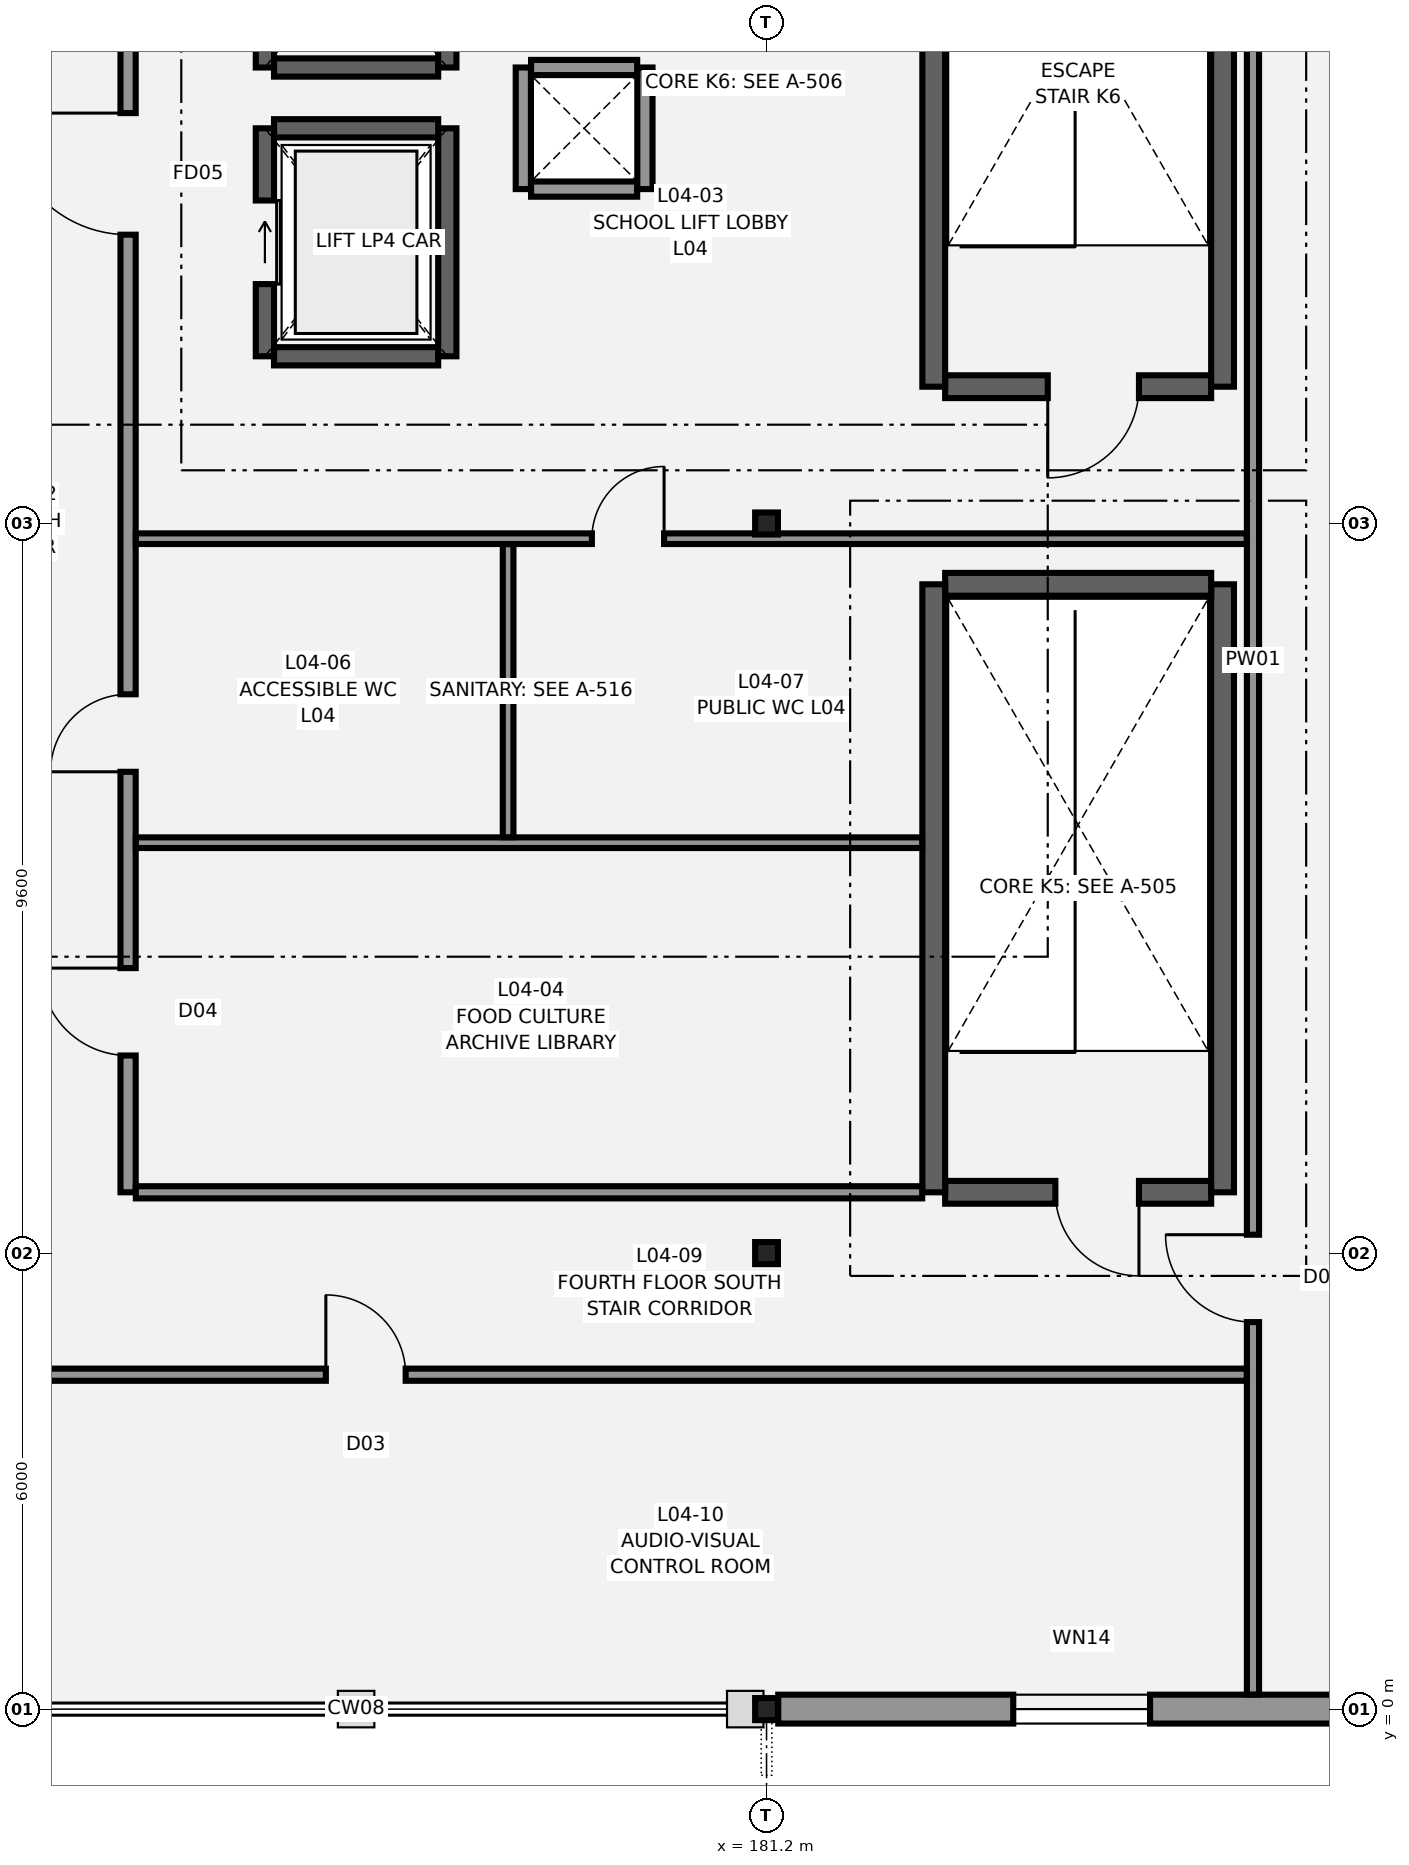
"""IFC4 building model, lengths in metres.
Left out: names, types, materials, properties, quantities, classifications, styles, units other than length and angle.
Written with IfcOpenShell. Run it as: python <this file> out.ifc"""

import sys

from ifc_helpers import new_model, si_unit, direction, frame, frame_2d, origin, origin_2d, place, context, subcontext, project, spatial, rectangle, i_section, extrude, element, fill, save


model = new_model("IFC4")
c1 = context("Model", 3, precision=1e-05, world=origin(), true_north=direction((0.0, 1.0)))
c2 = subcontext(c1, "Body", "Model", "MODEL_VIEW")
j1 = project(units=[si_unit("LENGTHUNIT", "METRE"), si_unit("PLANEANGLEUNIT", "RADIAN")], contexts=[c1])
p1 = place(None, origin())
s1 = spatial("IfcSite", under=j1, at=p1, CompositionType="ELEMENT")
p2 = place(p1, origin())
s2 = spatial("IfcBuilding", under=s1, at=p2, CompositionType="ELEMENT")
p3 = place(p2, frame((0.0, 0.0, 18.6)))
s3 = spatial("IfcBuildingStorey", under=s2, at=p3, CompositionType="ELEMENT", Elevation=18.6)
for number, where, z_axis, x_axis in (
    (1, (181.2, 0.0, 0.0), (0.0, 0.0, 1.0), (1.0, 0.0, 0.0)),
    (2, (181.2, 6.0, 0.0), (0.0, 0.0, 1.0), (1.0, 0.0, 0.0)),
    (3, (181.2, 15.6, 0.0), (0.0, 0.0, 1.0), (1.0, 0.0, 0.0)),
):
    element("IfcColumn", number, at=place(p3, frame(where, z_axis=z_axis, x_axis=x_axis)), inside=s3, PredefinedType="COLUMN", context=c2, shape_type="SweptSolid", body=[
        extrude(i_section(OverallWidth=0.3, OverallDepth=0.29, WebThickness=0.009, FlangeThickness=0.014, FilletRadius=0.027, at=origin_2d()), origin(), (0.0, 0.0, 1.0), 2.9),
    ])
p4 = place(p3, frame((187.05, 6.8, 0.0), z_axis=(0.0, 0.0, 1.0), x_axis=(-1.0, 0.0, 0.0)))
e4 = element("IfcWall", 4, at=p4, inside=s3, PredefinedType="SHEAR", context=c2, shape_type="SweptSolid", body=[
    extrude(rectangle(XDim=3.5, YDim=0.3, at=frame_2d((1.75, 0.0))), origin(), (0.0, 0.0, 1.0), 2.7),
])
p5 = place(p4, frame((0.95, 0.0, 0.0)))
e5 = element("IfcOpeningElement", 5, at=p5, cuts=e4, PredefinedType="OPENING", context=c2, shape_type="SweptSolid", body=[
    extrude(rectangle(XDim=1.1, YDim=2.15, at=frame_2d((0.55, 1.075))), frame((0.0, 0.16, 0.0), z_axis=(0.0, -1.0, 0.0), x_axis=(1.0, 0.0, 0.0)), (0.0, 0.0, 1.0), 0.32),
])
p6 = place(p3, frame((187.2, 6.8, 0.0), z_axis=(0.0, 0.0, 1.0), x_axis=(0.0, 1.0, 0.0)))
e6 = element("IfcWall", 6, at=p6, inside=s3, PredefinedType="SHEAR", context=c2, shape_type="SweptSolid", body=[
    extrude(rectangle(XDim=8.0, YDim=0.3, at=frame_2d((4.0, 0.0))), origin(), (0.0, 0.0, 1.0), 2.7),
])
p7 = place(p3, frame((187.05, 14.8, 0.0), z_axis=(0.0, 0.0, 1.0), x_axis=(-1.0, 0.0, 0.0)))
e7 = element("IfcWall", 7, at=p7, inside=s3, PredefinedType="SHEAR", context=c2, shape_type="SweptSolid", body=[
    extrude(rectangle(XDim=3.5, YDim=0.3, at=frame_2d((1.75, 0.0))), origin(), (0.0, 0.0, 1.0), 2.7),
])
p8 = place(p3, frame((183.4, 14.8, 0.0), z_axis=(0.0, 0.0, 1.0), x_axis=(0.0, -1.0, 0.0)))
e8 = element("IfcWall", 8, at=p8, inside=s3, PredefinedType="SHEAR", context=c2, shape_type="SweptSolid", body=[
    extrude(rectangle(XDim=8.0, YDim=0.3, at=frame_2d((4.0, 0.0))), origin(), (0.0, 0.0, 1.0), 2.7),
])
p9 = place(p3, frame((187.05, 17.4, 0.0), z_axis=(0.0, 0.0, 1.0), x_axis=(-1.0, 0.0, 0.0)))
e9 = element("IfcWall", 9, at=p9, inside=s3, PredefinedType="SHEAR", context=c2, shape_type="SweptSolid", body=[
    extrude(rectangle(XDim=3.5, YDim=0.3, at=frame_2d((1.75, 0.0))), origin(), (0.0, 0.0, 1.0), 2.7),
])
p10 = place(p9, frame((0.95, 0.0, 0.0)))
e10 = element("IfcOpeningElement", 10, at=p10, cuts=e9, PredefinedType="OPENING", context=c2, shape_type="SweptSolid", body=[
    extrude(rectangle(XDim=1.2, YDim=2.2, at=frame_2d((0.6, 1.1))), frame((0.0, 0.16, 0.0), z_axis=(0.0, -1.0, 0.0), x_axis=(1.0, 0.0, 0.0)), (0.0, 0.0, 1.0), 0.32),
])
for number, where, z_axis, x_axis in (
    (11, (187.2, 17.4, 0.0), (0.0, 0.0, 1.0), (0.0, 1.0, 0.0)),
    (12, (183.4, 25.4, 0.0), (0.0, 0.0, 1.0), (0.0, -1.0, 0.0)),
):
    element("IfcWall", number, at=place(p3, frame(where, z_axis=z_axis, x_axis=x_axis)), inside=s3, PredefinedType="SHEAR", context=c2, shape_type="SweptSolid", body=[
        extrude(rectangle(XDim=8.0, YDim=0.3, at=frame_2d((4.0, 0.0))), origin(), (0.0, 0.0, 1.0), 2.7),
    ])
p11 = place(p3, frame((174.72, 17.8, 0.0), z_axis=(0.0, 0.0, 1.0), x_axis=(1.0, 0.0, 0.0)))
e13 = element("IfcWall", 13, at=p11, inside=s3, PredefinedType="SHEAR", context=c2, shape_type="SweptSolid", body=[
    extrude(rectangle(XDim=2.16, YDim=0.24, at=frame_2d((1.08, 0.0))), origin(), (0.0, 0.0, 1.0), 2.7),
])
p12 = place(p3, frame((177.0, 17.8, 0.0), z_axis=(0.0, 0.0, 1.0), x_axis=(0.0, 1.0, 0.0)))
e14 = element("IfcWall", 14, at=p12, inside=s3, PredefinedType="SHEAR", context=c2, shape_type="SweptSolid", body=[
    extrude(rectangle(XDim=3.0, YDim=0.24, at=frame_2d((1.5, 0.0))), origin(), (0.0, 0.0, 1.0), 2.7),
])
p13 = place(p3, frame((176.88, 20.8, 0.0), z_axis=(0.0, 0.0, 1.0), x_axis=(-1.0, 0.0, 0.0)))
e15 = element("IfcWall", 15, at=p13, inside=s3, PredefinedType="SHEAR", context=c2, shape_type="SweptSolid", body=[
    extrude(rectangle(XDim=2.16, YDim=0.24, at=frame_2d((1.08, 0.0))), origin(), (0.0, 0.0, 1.0), 2.7),
])
p14 = place(p3, frame((174.6, 20.8, 0.0), z_axis=(0.0, 0.0, 1.0), x_axis=(0.0, -1.0, 0.0)))
e16 = element("IfcWall", 16, at=p14, inside=s3, PredefinedType="SHEAR", context=c2, shape_type="SweptSolid", body=[
    extrude(rectangle(XDim=3.0, YDim=0.24, at=frame_2d((1.5, 0.0))), origin(), (0.0, 0.0, 1.0), 2.7),
])
p15 = place(p14, frame((0.95, 0.0, 0.0)))
e17 = element("IfcOpeningElement", 17, at=p15, cuts=e16, PredefinedType="OPENING", context=c2, shape_type="SweptSolid", body=[
    extrude(rectangle(XDim=1.1, YDim=2.1, at=frame_2d((0.55, 1.05))), frame((0.0, 0.13, 0.0), z_axis=(0.0, -1.0, 0.0), x_axis=(1.0, 0.0, 0.0)), (0.0, 0.0, 1.0), 0.26),
])
p16 = place(p3, frame((174.72, 21.6, 0.0), z_axis=(0.0, 0.0, 1.0), x_axis=(1.0, 0.0, 0.0)))
e18 = element("IfcWall", 18, at=p16, inside=s3, PredefinedType="SHEAR", context=c2, shape_type="SweptSolid", body=[
    extrude(rectangle(XDim=2.16, YDim=0.24, at=frame_2d((1.08, 0.0))), origin(), (0.0, 0.0, 1.0), 2.7),
])
p17 = place(p3, frame((177.0, 21.6, 0.0), z_axis=(0.0, 0.0, 1.0), x_axis=(0.0, 1.0, 0.0)))
e19 = element("IfcWall", 19, at=p17, inside=s3, PredefinedType="SHEAR", context=c2, shape_type="SweptSolid", body=[
    extrude(rectangle(XDim=3.0, YDim=0.24, at=frame_2d((1.5, 0.0))), origin(), (0.0, 0.0, 1.0), 2.7),
])
p18 = place(p3, frame((174.6, 24.6, 0.0), z_axis=(0.0, 0.0, 1.0), x_axis=(0.0, -1.0, 0.0)))
e20 = element("IfcWall", 20, at=p18, inside=s3, PredefinedType="SHEAR", context=c2, shape_type="SweptSolid", body=[
    extrude(rectangle(XDim=3.0, YDim=0.24, at=frame_2d((1.5, 0.0))), origin(), (0.0, 0.0, 1.0), 2.7),
])
p19 = place(p18, frame((0.95, 0.0, 0.0)))
e21 = element("IfcOpeningElement", 21, at=p19, cuts=e20, PredefinedType="OPENING", context=c2, shape_type="SweptSolid", body=[
    extrude(rectangle(XDim=1.1, YDim=2.1, at=frame_2d((0.55, 1.05))), frame((0.0, 0.13, 0.0), z_axis=(0.0, -1.0, 0.0), x_axis=(1.0, 0.0, 0.0)), (0.0, 0.0, 1.0), 0.26),
])
p20 = place(p3, frame((191.846, 0.0, 0.0), z_axis=(0.0, 0.0, 1.0), x_axis=(-1.0, 0.0, 0.0)))
e22 = element("IfcWall", 22, at=p20, inside=s3, PredefinedType="STANDARD", context=c2, shape_type="SweptSolid", body=[
    extrude(rectangle(XDim=10.492, YDim=0.38, at=frame_2d((5.246, 0.0))), origin(), (0.0, 0.0, 1.0), 2.45),
])
p21 = place(p20, frame((1.0, 0.0, 0.8)))
e23 = element("IfcOpeningElement", 23, at=p21, cuts=e22, PredefinedType="OPENING", context=c2, shape_type="SweptSolid", body=[
    extrude(rectangle(XDim=2.2, YDim=1.4, at=frame_2d((1.1, 0.7))), frame((0.0, 0.2, 0.0), z_axis=(0.0, -1.0, 0.0), x_axis=(1.0, 0.0, 0.0)), (0.0, 0.0, 1.0), 0.4),
])
p22 = place(p20, frame((5.6, 0.0, 0.8)))
e24 = element("IfcOpeningElement", 24, at=p22, cuts=e22, PredefinedType="OPENING", context=c2, shape_type="SweptSolid", body=[
    extrude(rectangle(XDim=1.8, YDim=1.4, at=frame_2d((0.9, 0.7))), frame((0.0, 0.2, 0.0), z_axis=(0.0, -1.0, 0.0), x_axis=(1.0, 0.0, 0.0)), (0.0, 0.0, 1.0), 0.4),
])
p23 = place(p3, frame((187.6, 0.192, 0.0), z_axis=(0.0, 0.0, 1.0), x_axis=(0.0, 1.0, 0.0)))
e25 = element("IfcWall", 25, at=p23, inside=s3, PredefinedType="PARTITIONING", context=c2, shape_type="SweptSolid", body=[
    extrude(rectangle(XDim=27.236, YDim=0.16, at=frame_2d((13.618, 0.0))), origin(), (0.0, 0.0, 1.0), 2.45),
])
p24 = place(p23, frame((4.9, 0.0, 0.0)))
e26 = element("IfcOpeningElement", 26, at=p24, cuts=e25, PredefinedType="OPENING", context=c2, shape_type="SweptSolid", body=[
    extrude(rectangle(XDim=1.15, YDim=2.15, at=frame_2d((0.575, 1.075))), frame((0.0, 0.09, 0.0), z_axis=(0.0, -1.0, 0.0), x_axis=(1.0, 0.0, 0.0)), (0.0, 0.0, 1.0), 0.18),
])
p25 = place(p3, frame((169.902, 4.4, 0.0), z_axis=(0.0, 0.0, 1.0), x_axis=(1.0, 0.0, 0.0)))
e27 = element("IfcWall", 27, at=p25, inside=s3, PredefinedType="PARTITIONING", context=c2, shape_type="SweptSolid", body=[
    extrude(rectangle(XDim=17.616, YDim=0.16, at=frame_2d((8.808, 0.0))), origin(), (0.0, 0.0, 1.0), 2.45),
])
p26 = place(p25, frame((5.5, 0.0, 0.0)))
e28 = element("IfcOpeningElement", 28, at=p26, cuts=e27, PredefinedType="OPENING", context=c2, shape_type="SweptSolid", body=[
    extrude(rectangle(XDim=1.05, YDim=2.15, at=frame_2d((0.525, 1.075))), frame((0.0, 0.09, 0.0), z_axis=(0.0, -1.0, 0.0), x_axis=(1.0, 0.0, 0.0)), (0.0, 0.0, 1.0), 0.18),
])
p27 = place(p3, frame((172.8, 6.8, 0.0), z_axis=(0.0, 0.0, 1.0), x_axis=(0.0, 1.0, 0.0)))
e29 = element("IfcWall", 29, at=p27, inside=s3, PredefinedType="PARTITIONING", context=c2, shape_type="SweptSolid", body=[
    extrude(rectangle(XDim=20.628, YDim=0.2, at=frame_2d((10.314, 0.0))), origin(), (0.0, 0.0, 1.0), 2.45),
])
p28 = place(p27, frame((1.8, 0.0, 0.0)))
e30 = element("IfcOpeningElement", 30, at=p28, cuts=e29, PredefinedType="OPENING", context=c2, shape_type="SweptSolid", body=[
    extrude(rectangle(XDim=1.15, YDim=2.15, at=frame_2d((0.575, 1.075))), frame((0.0, 0.11, 0.0), z_axis=(0.0, -1.0, 0.0), x_axis=(1.0, 0.0, 0.0)), (0.0, 0.0, 1.0), 0.22),
])
p29 = place(p27, frame((5.533, 0.0, 0.0)))
e31 = element("IfcOpeningElement", 31, at=p29, cuts=e29, PredefinedType="OPENING", context=c2, shape_type="SweptSolid", body=[
    extrude(rectangle(XDim=1.02, YDim=2.12, at=frame_2d((0.51, 1.06))), frame((0.0, 0.11, 0.0), z_axis=(0.0, -1.0, 0.0), x_axis=(1.0, 0.0, 0.0)), (0.0, 0.0, 1.0), 0.22),
])
p30 = place(p27, frame((12.6, 0.0, 0.0)))
e32 = element("IfcOpeningElement", 32, at=p30, cuts=e29, PredefinedType="OPENING", context=c2, shape_type="SweptSolid", body=[
    extrude(rectangle(XDim=1.6, YDim=2.2, at=frame_2d((0.8, 1.1))), frame((0.0, 0.11, 0.0), z_axis=(0.0, -1.0, 0.0), x_axis=(1.0, 0.0, 0.0)), (0.0, 0.0, 1.0), 0.22),
])
p31 = place(p27, frame((18.223, 0.0, 0.0)))
e33 = element("IfcOpeningElement", 33, at=p31, cuts=e29, PredefinedType="OPENING", context=c2, shape_type="SweptSolid", body=[
    extrude(rectangle(XDim=1.05, YDim=2.15, at=frame_2d((0.525, 1.075))), frame((0.0, 0.11, 0.0), z_axis=(0.0, -1.0, 0.0), x_axis=(1.0, 0.0, 0.0)), (0.0, 0.0, 1.0), 0.22),
])
p32 = place(p3, frame((172.902, 6.8, 0.0), z_axis=(0.0, 0.0, 1.0), x_axis=(1.0, 0.0, 0.0)))
e34 = element("IfcWall", 34, at=p32, inside=s3, PredefinedType="PARTITIONING", context=c2, shape_type="SweptSolid", body=[
    extrude(rectangle(XDim=10.346, YDim=0.16, at=frame_2d((5.173, 0.0))), origin(), (0.0, 0.0, 1.0), 2.45),
])
p33 = place(p3, frame((172.902, 11.4, 0.0), z_axis=(0.0, 0.0, 1.0), x_axis=(1.0, 0.0, 0.0)))
e35 = element("IfcWall", 35, at=p33, inside=s3, PredefinedType="PARTITIONING", context=c2, shape_type="SweptSolid", body=[
    extrude(rectangle(XDim=10.346, YDim=0.14, at=frame_2d((5.173, 0.0))), origin(), (0.0, 0.0, 1.0), 2.45),
])
p34 = place(p3, frame((172.902, 15.4, 0.0), z_axis=(0.0, 0.0, 1.0), x_axis=(1.0, 0.0, 0.0)))
e36 = element("IfcWall", 36, at=p34, inside=s3, PredefinedType="PARTITIONING", context=c2, shape_type="SweptSolid", body=[
    extrude(rectangle(XDim=14.616, YDim=0.14, at=frame_2d((7.308, 0.0))), origin(), (0.0, 0.0, 1.0), 2.45),
])
p35 = place(p34, frame((6.0, 0.0, 0.0)))
e37 = element("IfcOpeningElement", 37, at=p35, cuts=e36, PredefinedType="OPENING", context=c2, shape_type="SweptSolid", body=[
    extrude(rectangle(XDim=0.95, YDim=2.1, at=frame_2d((0.475, 1.05))), frame((0.0, 0.08, 0.0), z_axis=(0.0, -1.0, 0.0), x_axis=(1.0, 0.0, 0.0)), (0.0, 0.0, 1.0), 0.16),
])
p36 = place(p3, frame((177.8, 11.472, 0.0), z_axis=(0.0, 0.0, 1.0), x_axis=(0.0, 1.0, 0.0)))
e38 = element("IfcWall", 38, at=p36, inside=s3, PredefinedType="PARTITIONING", context=c2, shape_type="SweptSolid", body=[
    extrude(rectangle(XDim=3.856, YDim=0.14, at=frame_2d((1.928, 0.0))), origin(), (0.0, 0.0, 1.0), 2.45),
])
p37 = place(p3, frame((178.102, 20.0, 0.0), z_axis=(0.0, 0.0, 1.0), x_axis=(1.0, 0.0, 0.0)))
e39 = element("IfcWall", 39, at=p37, inside=s3, PredefinedType="PARTITIONING", context=c2, shape_type="SweptSolid", body=[
    extrude(rectangle(XDim=1.396, YDim=0.2, at=frame_2d((0.698, 0.0))), origin(), (0.0, 0.0, 1.0), 2.45),
])
p38 = place(p3, frame((179.6, 20.0, 0.0), z_axis=(0.0, 0.0, 1.0), x_axis=(0.0, 1.0, 0.0)))
e40 = element("IfcWall", 40, at=p38, inside=s3, PredefinedType="PARTITIONING", context=c2, shape_type="SweptSolid", body=[
    extrude(rectangle(XDim=1.6, YDim=0.2, at=frame_2d((0.8, 0.0))), origin(), (0.0, 0.0, 1.0), 2.45),
])
p39 = place(p3, frame((179.498, 21.6, 0.0), z_axis=(0.0, 0.0, 1.0), x_axis=(-1.0, 0.0, 0.0)))
e41 = element("IfcWall", 41, at=p39, inside=s3, PredefinedType="PARTITIONING", context=c2, shape_type="SweptSolid", body=[
    extrude(rectangle(XDim=1.396, YDim=0.2, at=frame_2d((0.698, 0.0))), origin(), (0.0, 0.0, 1.0), 2.45),
])
p40 = place(p3, frame((178.0, 21.6, 0.0), z_axis=(0.0, 0.0, 1.0), x_axis=(0.0, -1.0, 0.0)))
e42 = element("IfcWall", 42, at=p40, inside=s3, PredefinedType="PARTITIONING", context=c2, shape_type="SweptSolid", body=[
    extrude(rectangle(XDim=1.6, YDim=0.2, at=frame_2d((0.8, 0.0))), origin(), (0.0, 0.0, 1.0), 2.45),
])
p41 = place(p22, origin())
e43 = element("IfcWindow", 43, at=p41, inside=s3, PartitioningType="SINGLE_PANEL", PredefinedType="WINDOW", context=c2, shape_type="SweptSolid", body=[
    extrude(rectangle(XDim=1.8, YDim=1.4, at=frame_2d((0.9, 0.7))), frame((0.0, 0.03, 0.0), z_axis=(0.0, -1.0, 0.0), x_axis=(1.0, 0.0, 0.0)), (0.0, 0.0, 1.0), 0.06),
])
fill(e24, e43)
p42 = place(p24, origin())
e44 = element("IfcDoor", 44, at=p42, inside=s3, OperationType="SINGLE_SWING_RIGHT", PredefinedType="DOOR", context=c2, shape_type="SweptSolid", body=[
    extrude(rectangle(XDim=1.15, YDim=2.15, at=frame_2d((0.575, 1.075))), frame((0.0, 0.025, 0.0), z_axis=(0.0, -1.0, 0.0), x_axis=(1.0, 0.0, 0.0)), (0.0, 0.0, 1.0), 0.05),
])
fill(e26, e44)
p43 = place(p26, origin())
e45 = element("IfcDoor", 45, at=p43, inside=s3, OperationType="SINGLE_SWING_LEFT", PredefinedType="DOOR", context=c2, shape_type="SweptSolid", body=[
    extrude(rectangle(XDim=1.05, YDim=2.15, at=frame_2d((0.525, 1.075))), frame((0.0, 0.025, 0.0), z_axis=(0.0, -1.0, 0.0), x_axis=(1.0, 0.0, 0.0)), (0.0, 0.0, 1.0), 0.05),
])
fill(e28, e45)
p44 = place(p28, origin())
e46 = element("IfcDoor", 46, at=p44, inside=s3, OperationType="SINGLE_SWING_RIGHT", PredefinedType="DOOR", context=c2, shape_type="SweptSolid", body=[
    extrude(rectangle(XDim=1.15, YDim=2.15, at=frame_2d((0.575, 1.075))), frame((0.0, 0.025, 0.0), z_axis=(0.0, -1.0, 0.0), x_axis=(1.0, 0.0, 0.0)), (0.0, 0.0, 1.0), 0.05),
])
fill(e30, e46)
p45 = place(p29, origin())
e47 = element("IfcDoor", 47, at=p45, inside=s3, OperationType="SINGLE_SWING_LEFT", PredefinedType="DOOR", context=c2, shape_type="SweptSolid", body=[
    extrude(rectangle(XDim=1.02, YDim=2.12, at=frame_2d((0.51, 1.06))), frame((0.0, 0.025, 0.0), z_axis=(0.0, -1.0, 0.0), x_axis=(1.0, 0.0, 0.0)), (0.0, 0.0, 1.0), 0.05),
])
fill(e31, e47)
p46 = place(p30, origin())
e48 = element("IfcDoor", 48, at=p46, inside=s3, OperationType="SINGLE_SWING_RIGHT", PredefinedType="DOOR", context=c2, shape_type="SweptSolid", body=[
    extrude(rectangle(XDim=1.6, YDim=2.2, at=frame_2d((0.8, 1.1))), frame((0.0, 0.025, 0.0), z_axis=(0.0, -1.0, 0.0), x_axis=(1.0, 0.0, 0.0)), (0.0, 0.0, 1.0), 0.05),
])
fill(e32, e48)
p47 = place(p35, origin())
e49 = element("IfcDoor", 49, at=p47, inside=s3, OperationType="SINGLE_SWING_RIGHT", PredefinedType="DOOR", context=c2, shape_type="SweptSolid", body=[
    extrude(rectangle(XDim=0.95, YDim=2.1, at=frame_2d((0.475, 1.05))), frame((0.0, 0.025, 0.0), z_axis=(0.0, -1.0, 0.0), x_axis=(1.0, 0.0, 0.0)), (0.0, 0.0, 1.0), 0.05),
])
fill(e37, e49)
p48 = place(p5, origin())
e50 = element("IfcDoor", 50, at=p48, inside=s3, OperationType="SINGLE_SWING_LEFT", PredefinedType="DOOR", context=c2, shape_type="SweptSolid", body=[
    extrude(rectangle(XDim=1.1, YDim=2.15, at=frame_2d((0.55, 1.075))), frame((0.0, 0.025, 0.0), z_axis=(0.0, -1.0, 0.0), x_axis=(1.0, 0.0, 0.0)), (0.0, 0.0, 1.0), 0.05),
])
fill(e5, e50)
p49 = place(p10, origin())
e51 = element("IfcDoor", 51, at=p49, inside=s3, OperationType="SINGLE_SWING_RIGHT", PredefinedType="DOOR", context=c2, shape_type="SweptSolid", body=[
    extrude(rectangle(XDim=1.2, YDim=2.2, at=frame_2d((0.6, 1.1))), frame((0.0, 0.025, 0.0), z_axis=(0.0, -1.0, 0.0), x_axis=(1.0, 0.0, 0.0)), (0.0, 0.0, 1.0), 0.05),
])
fill(e10, e51)
p50 = place(p15, origin())
e52 = element("IfcDoor", 52, at=p50, inside=s3, OperationType="SLIDING_TO_LEFT", PredefinedType="DOOR", context=c2, shape_type="SweptSolid", body=[
    extrude(rectangle(XDim=1.1, YDim=2.1, at=frame_2d((0.55, 1.05))), frame((0.0, 0.025, 0.0), z_axis=(0.0, -1.0, 0.0), x_axis=(1.0, 0.0, 0.0)), (0.0, 0.0, 1.0), 0.05),
])
fill(e17, e52)
save(model, sys.argv[1])
